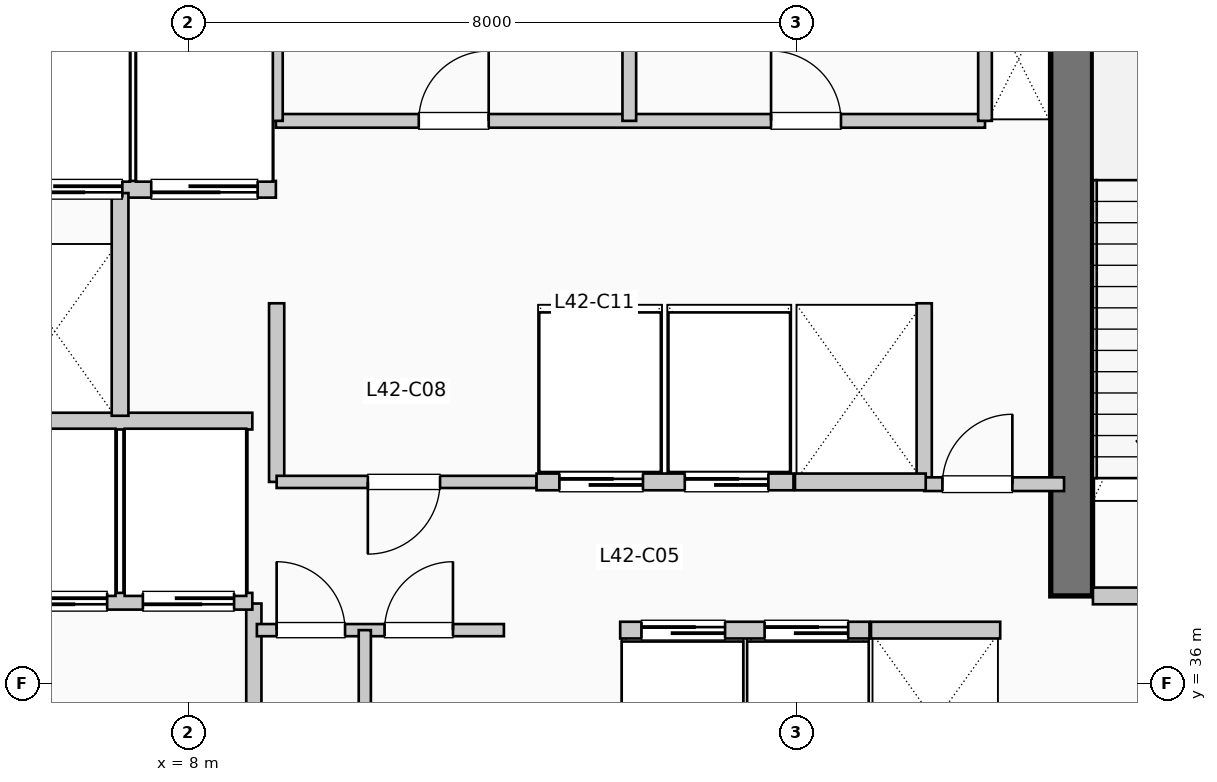
"""IFC4 building model, lengths in metres.
Left out: names, types, materials, properties, quantities, classifications, styles, units other than length and angle.
Written with IfcOpenShell. Run it as: python <this file> out.ifc"""

import sys

from ifc_helpers import new_model, si_unit, direction, frame, frame_2d, origin, place, context, subcontext, project, spatial, rectangle, extrude, element, fill, save


model = new_model("IFC4")
c1 = context("Model", 3, precision=1e-05, world=origin(), true_north=direction((0.0, 1.0)))
c2 = subcontext(c1, "Body", "Model", "MODEL_VIEW")
j1 = project(units=[si_unit("LENGTHUNIT", "METRE"), si_unit("PLANEANGLEUNIT", "RADIAN")], contexts=[c1])
p1 = place(None, origin())
s1 = spatial("IfcSite", under=j1, at=p1, CompositionType="ELEMENT")
p2 = place(p1, origin())
s2 = spatial("IfcBuilding", under=s1, at=p2, CompositionType="ELEMENT")
p3 = place(p2, frame((0.0, 0.0, 174.57)))
s3 = spatial("IfcBuildingStorey", under=s2, at=p3, CompositionType="ELEMENT", Elevation=174.57)
p4 = place(p3, frame((19.62, 37.15, 0.0), z_axis=(0.0, 0.0, 1.0), x_axis=(0.0, 1.0, 0.0)))
e1 = element("IfcWall", 1, at=p4, inside=s3, PredefinedType="SHEAR", context=c2, shape_type="SweptSolid", body=[
    extrude(rectangle(XDim=7.89, YDim=0.55, at=frame_2d((3.945, 0.0))), origin(), (0.0, 0.0, 1.0), 4.95),
])
p5 = place(p3, frame((8.86, 34.55, 0.0), z_axis=(0.0, 0.0, 1.0), x_axis=(0.0, 1.0, 0.0)))
e2 = element("IfcWall", 2, at=p5, inside=s3, PredefinedType="PARTITIONING", context=c2, shape_type="SweptSolid", body=[
    extrude(rectangle(XDim=2.5, YDim=0.2, at=frame_2d((1.25, 0.0))), origin(), (0.0, 0.0, 1.0), 4.7),
])
p6 = place(p3, frame((19.9, 37.15, 0.0), z_axis=(0.0, 0.0, 1.0), x_axis=(1.0, 0.0, 0.0)))
e3 = element("IfcWall", 3, at=p6, inside=s3, PredefinedType="PARTITIONING", context=c2, shape_type="SweptSolid", body=[
    extrude(rectangle(XDim=3.15, YDim=0.22, at=frame_2d((1.575, 0.0))), origin(), (0.0, 0.0, 1.0), 4.7),
])
p7 = place(p6, frame((2.05, 0.0, 0.0), z_axis=(0.0, 0.0, 1.0), x_axis=(-1.0, 0.0, 0.0)))
e4 = element("IfcOpeningElement", 4, at=p7, cuts=e3, PredefinedType="OPENING", context=c2, shape_type="SweptSolid", body=[
    extrude(rectangle(XDim=1.05, YDim=2.15, at=frame_2d((0.525, 1.075))), frame((0.0, 0.12, 0.0), z_axis=(0.0, -1.0, 0.0), x_axis=(1.0, 0.0, 0.0)), (0.0, 0.0, 1.0), 0.24),
])
p8 = place(p3, frame((5.38, 37.08, 0.0), z_axis=(0.0, 0.0, 1.0), x_axis=(1.0, 0.0, 0.0)))
e5 = element("IfcWall", 5, at=p8, inside=s3, PredefinedType="PARTITIONING", context=c2, shape_type="SweptSolid", body=[
    extrude(rectangle(XDim=3.46, YDim=0.22, at=frame_2d((1.73, 0.0))), origin(), (0.0, 0.0, 1.0), 4.7),
])
p9 = place(p8, frame((1.55, 0.0, 0.0), z_axis=(0.0, 0.0, 1.0), x_axis=(-1.0, 0.0, 0.0)))
e6 = element("IfcOpeningElement", 6, at=p9, cuts=e5, PredefinedType="OPENING", context=c2, shape_type="SweptSolid", body=[
    extrude(rectangle(XDim=1.2, YDim=2.2, at=frame_2d((0.6, 1.1))), frame((0.0, 0.12, 0.0), z_axis=(0.0, -1.0, 0.0), x_axis=(1.0, 0.0, 0.0)), (0.0, 0.0, 1.0), 0.24),
])
p10 = place(p8, frame((3.22, 0.0, 0.0), z_axis=(0.0, 0.0, 1.0), x_axis=(-1.0, 0.0, 0.0)))
e7 = element("IfcOpeningElement", 7, at=p10, cuts=e5, PredefinedType="OPENING", context=c2, shape_type="SweptSolid", body=[
    extrude(rectangle(XDim=1.2, YDim=2.2, at=frame_2d((0.6, 1.1))), frame((0.0, 0.12, 0.0), z_axis=(0.0, -1.0, 0.0), x_axis=(1.0, 0.0, 0.0)), (0.0, 0.0, 1.0), 0.24),
])
p11 = place(p3, frame((5.38, 39.45, 0.0), z_axis=(0.0, 0.0, 1.0), x_axis=(1.0, 0.0, 0.0)))
e8 = element("IfcWall", 8, at=p11, inside=s3, PredefinedType="PARTITIONING", context=c2, shape_type="SweptSolid", body=[
    extrude(rectangle(XDim=3.46, YDim=0.22, at=frame_2d((1.73, 0.0))), origin(), (0.0, 0.0, 1.0), 4.7),
])
p12 = place(p3, frame((5.38, 42.5, 0.0), z_axis=(0.0, 0.0, 1.0), x_axis=(1.0, 0.0, 0.0)))
e9 = element("IfcWall", 9, at=p12, inside=s3, PredefinedType="PARTITIONING", context=c2, shape_type="SweptSolid", body=[
    extrude(rectangle(XDim=3.77, YDim=0.22, at=frame_2d((1.885, 0.0))), origin(), (0.0, 0.0, 1.0), 4.7),
])
p13 = place(p12, frame((1.75, 0.0, 0.0), z_axis=(0.0, 0.0, 1.0), x_axis=(-1.0, 0.0, 0.0)))
e10 = element("IfcOpeningElement", 10, at=p13, cuts=e9, PredefinedType="OPENING", context=c2, shape_type="SweptSolid", body=[
    extrude(rectangle(XDim=1.4, YDim=2.2, at=frame_2d((0.7, 1.1))), frame((0.0, 0.12, 0.0), z_axis=(0.0, -1.0, 0.0), x_axis=(1.0, 0.0, 0.0)), (0.0, 0.0, 1.0), 0.24),
])
p14 = place(p12, frame((3.53, 0.0, 0.0), z_axis=(0.0, 0.0, 1.0), x_axis=(-1.0, 0.0, 0.0)))
e11 = element("IfcOpeningElement", 11, at=p14, cuts=e9, PredefinedType="OPENING", context=c2, shape_type="SweptSolid", body=[
    extrude(rectangle(XDim=1.4, YDim=2.2, at=frame_2d((0.7, 1.1))), frame((0.0, 0.12, 0.0), z_axis=(0.0, -1.0, 0.0), x_axis=(1.0, 0.0, 0.0)), (0.0, 0.0, 1.0), 0.24),
])
p15 = place(p3, frame((7.1, 39.52, 0.0), z_axis=(0.0, 0.0, 1.0), x_axis=(0.0, 1.0, 0.0)))
e12 = element("IfcWall", 12, at=p15, inside=s3, PredefinedType="PARTITIONING", context=c2, shape_type="SweptSolid", body=[
    extrude(rectangle(XDim=2.93, YDim=0.22, at=frame_2d((1.465, 0.0))), origin(), (0.0, 0.0, 1.0), 4.7),
])
for number, where, z_axis, x_axis in (
    (13, (9.16, 38.65, 0.0), (0.0, 0.0, 1.0), (0.0, 1.0, 0.0)),
    (14, (17.68, 38.65, 0.0), (0.0, 0.0, 1.0), (0.0, 1.0, 0.0)),
):
    element("IfcWall", number, at=place(p3, frame(where, z_axis=z_axis, x_axis=x_axis)), inside=s3, PredefinedType="PARTITIONING", context=c2, shape_type="SweptSolid", body=[
        extrude(rectangle(XDim=2.35, YDim=0.2, at=frame_2d((1.175, 0.0))), origin(), (0.0, 0.0, 1.0), 4.7),
    ])
p16 = place(p3, frame((17.68, 38.62, 0.0), z_axis=(0.0, 0.0, 1.0), x_axis=(1.0, 0.0, 0.0)))
e15 = element("IfcWall", 15, at=p16, inside=s3, PredefinedType="PARTITIONING", context=c2, shape_type="SweptSolid", body=[
    extrude(rectangle(XDim=1.84, YDim=0.18, at=frame_2d((0.92, 0.0))), origin(), (0.0, 0.0, 1.0), 4.7),
])
p17 = place(p16, frame((0.24, 0.0, 0.0)))
e16 = element("IfcOpeningElement", 16, at=p17, cuts=e15, PredefinedType="OPENING", context=c2, shape_type="SweptSolid", body=[
    extrude(rectangle(XDim=0.92, YDim=2.1, at=frame_2d((0.46, 1.05))), frame((0.0, 0.1, 0.0), z_axis=(0.0, -1.0, 0.0), x_axis=(1.0, 0.0, 0.0)), (0.0, 0.0, 1.0), 0.2),
])
p18 = place(p3, frame((8.9, 36.7, 0.0), z_axis=(0.0, 0.0, 1.0), x_axis=(1.0, 0.0, 0.0)))
e17 = element("IfcWall", 17, at=p18, inside=s3, PredefinedType="PARTITIONING", context=c2, shape_type="SweptSolid", body=[
    extrude(rectangle(XDim=3.25, YDim=0.16, at=frame_2d((1.625, 0.0))), origin(), (0.0, 0.0, 1.0), 4.7),
])
p19 = place(p18, frame((0.26, 0.0, 0.0)))
e18 = element("IfcOpeningElement", 18, at=p19, cuts=e17, PredefinedType="OPENING", context=c2, shape_type="SweptSolid", body=[
    extrude(rectangle(XDim=0.9, YDim=2.15, at=frame_2d((0.45, 1.075))), frame((0.0, 0.09, 0.0), z_axis=(0.0, -1.0, 0.0), x_axis=(1.0, 0.0, 0.0)), (0.0, 0.0, 1.0), 0.18),
])
p20 = place(p18, frame((1.68, 0.0, 0.0)))
e19 = element("IfcOpeningElement", 19, at=p20, cuts=e17, PredefinedType="OPENING", context=c2, shape_type="SweptSolid", body=[
    extrude(rectangle(XDim=0.9, YDim=2.15, at=frame_2d((0.45, 1.075))), frame((0.0, 0.09, 0.0), z_axis=(0.0, -1.0, 0.0), x_axis=(1.0, 0.0, 0.0)), (0.0, 0.0, 1.0), 0.18),
])
p21 = place(p3, frame((10.32, 34.55, 0.0), z_axis=(0.0, 0.0, 1.0), x_axis=(0.0, 1.0, 0.0)))
e20 = element("IfcWall", 20, at=p21, inside=s3, PredefinedType="PARTITIONING", context=c2, shape_type="SweptSolid", body=[
    extrude(rectangle(XDim=2.15, YDim=0.16, at=frame_2d((1.075, 0.0))), origin(), (0.0, 0.0, 1.0), 4.7),
])
p22 = place(p3, frame((9.16, 38.65, 0.0), z_axis=(0.0, 0.0, 1.0), x_axis=(1.0, 0.0, 0.0)))
e21 = element("IfcWall", 21, at=p22, inside=s3, PredefinedType="PARTITIONING", context=c2, shape_type="SweptSolid", body=[
    extrude(rectangle(XDim=3.42, YDim=0.16, at=frame_2d((1.71, 0.0))), origin(), (0.0, 0.0, 1.0), 4.7),
])
p23 = place(p22, frame((2.15, 0.0, 0.0), z_axis=(0.0, 0.0, 1.0), x_axis=(-1.0, 0.0, 0.0)))
e22 = element("IfcOpeningElement", 22, at=p23, cuts=e21, PredefinedType="OPENING", context=c2, shape_type="SweptSolid", body=[
    extrude(rectangle(XDim=0.95, YDim=2.15, at=frame_2d((0.475, 1.075))), frame((0.0, 0.09, 0.0), z_axis=(0.0, -1.0, 0.0), x_axis=(1.0, 0.0, 0.0)), (0.0, 0.0, 1.0), 0.18),
])
p24 = place(p3, frame((13.68, 36.7, 0.0), z_axis=(0.0, 0.0, 1.0), x_axis=(1.0, 0.0, 0.0)))
e23 = element("IfcWall", 23, at=p24, inside=s3, PredefinedType="PARTITIONING", context=c2, shape_type="SweptSolid", body=[
    extrude(rectangle(XDim=3.28, YDim=0.22, at=frame_2d((1.64, 0.0))), origin(), (0.0, 0.0, 1.0), 4.7),
])
p25 = place(p24, frame((0.28, 0.0, 0.0)))
e24 = element("IfcOpeningElement", 24, at=p25, cuts=e23, PredefinedType="OPENING", context=c2, shape_type="SweptSolid", body=[
    extrude(rectangle(XDim=1.1, YDim=2.2, at=frame_2d((0.55, 1.1))), frame((0.0, 0.12, 0.0), z_axis=(0.0, -1.0, 0.0), x_axis=(1.0, 0.0, 0.0)), (0.0, 0.0, 1.0), 0.24),
])
p26 = place(p24, frame((1.9, 0.0, 0.0)))
e25 = element("IfcOpeningElement", 25, at=p26, cuts=e23, PredefinedType="OPENING", context=c2, shape_type="SweptSolid", body=[
    extrude(rectangle(XDim=1.1, YDim=2.2, at=frame_2d((0.55, 1.1))), frame((0.0, 0.12, 0.0), z_axis=(0.0, -1.0, 0.0), x_axis=(1.0, 0.0, 0.0)), (0.0, 0.0, 1.0), 0.24),
])
p27 = place(p3, frame((12.58, 38.65, 0.0), z_axis=(0.0, 0.0, 1.0), x_axis=(1.0, 0.0, 0.0)))
e26 = element("IfcWall", 26, at=p27, inside=s3, PredefinedType="PARTITIONING", context=c2, shape_type="SweptSolid", body=[
    extrude(rectangle(XDim=3.38, YDim=0.22, at=frame_2d((1.69, 0.0))), origin(), (0.0, 0.0, 1.0), 4.7),
])
p28 = place(p27, frame((0.3, 0.0, 0.0)))
e27 = element("IfcOpeningElement", 27, at=p28, cuts=e26, PredefinedType="OPENING", context=c2, shape_type="SweptSolid", body=[
    extrude(rectangle(XDim=1.1, YDim=2.2, at=frame_2d((0.55, 1.1))), frame((0.0, 0.12, 0.0), z_axis=(0.0, -1.0, 0.0), x_axis=(1.0, 0.0, 0.0)), (0.0, 0.0, 1.0), 0.24),
])
p29 = place(p27, frame((1.95, 0.0, 0.0)))
e28 = element("IfcOpeningElement", 28, at=p29, cuts=e26, PredefinedType="OPENING", context=c2, shape_type="SweptSolid", body=[
    extrude(rectangle(XDim=1.1, YDim=2.2, at=frame_2d((0.55, 1.1))), frame((0.0, 0.12, 0.0), z_axis=(0.0, -1.0, 0.0), x_axis=(1.0, 0.0, 0.0)), (0.0, 0.0, 1.0), 0.24),
])
p30 = place(p3, frame((16.98, 36.7, 0.0), z_axis=(0.0, 0.0, 1.0), x_axis=(1.0, 0.0, 0.0)))
e29 = element("IfcWall", 29, at=p30, inside=s3, PredefinedType="PARTITIONING", context=c2, shape_type="SweptSolid", body=[
    extrude(rectangle(XDim=1.7, YDim=0.22, at=frame_2d((0.85, 0.0))), origin(), (0.0, 0.0, 1.0), 4.7),
])
p31 = place(p3, frame((15.98, 38.65, 0.0), z_axis=(0.0, 0.0, 1.0), x_axis=(1.0, 0.0, 0.0)))
e30 = element("IfcWall", 30, at=p31, inside=s3, PredefinedType="PARTITIONING", context=c2, shape_type="SweptSolid", body=[
    extrude(rectangle(XDim=1.72, YDim=0.22, at=frame_2d((0.86, 0.0))), origin(), (0.0, 0.0, 1.0), 4.7),
])
p32 = place(p3, frame((9.15, 43.4, 0.0), z_axis=(0.0, 0.0, 1.0), x_axis=(1.0, 0.0, 0.0)))
e31 = element("IfcWall", 31, at=p32, inside=s3, PredefinedType="PLUMBINGWALL", context=c2, shape_type="SweptSolid", body=[
    extrude(rectangle(XDim=9.33, YDim=0.18, at=frame_2d((4.665, 0.0))), origin(), (0.0, 0.0, 1.0), 4.7),
])
p33 = place(p32, frame((1.88, 0.0, 0.0)))
e32 = element("IfcOpeningElement", 32, at=p33, cuts=e31, PredefinedType="OPENING", context=c2, shape_type="SweptSolid", body=[
    extrude(rectangle(XDim=0.92, YDim=2.1, at=frame_2d((0.46, 1.05))), frame((0.0, 0.1, 0.0), z_axis=(0.0, -1.0, 0.0), x_axis=(1.0, 0.0, 0.0)), (0.0, 0.0, 1.0), 0.2),
])
p34 = place(p32, frame((6.515, 0.0, 0.0)))
e33 = element("IfcOpeningElement", 33, at=p34, cuts=e31, PredefinedType="OPENING", context=c2, shape_type="SweptSolid", body=[
    extrude(rectangle(XDim=0.92, YDim=2.1, at=frame_2d((0.46, 1.05))), frame((0.0, 0.1, 0.0), z_axis=(0.0, -1.0, 0.0), x_axis=(1.0, 0.0, 0.0)), (0.0, 0.0, 1.0), 0.2),
])
for number, where, z_axis, x_axis in (
    (34, (9.15, 43.4, 0.0), (0.0, 0.0, 1.0), (0.0, 1.0, 0.0)),
    (35, (18.48, 43.4, 0.0), (0.0, 0.0, 1.0), (0.0, 1.0, 0.0)),
    (36, (13.8, 43.4, 0.0), (0.0, 0.0, 1.0), (0.0, 1.0, 0.0)),
):
    element("IfcWall", number, at=place(p3, frame(where, z_axis=z_axis, x_axis=x_axis)), inside=s3, PredefinedType="PLUMBINGWALL", context=c2, shape_type="SweptSolid", body=[
        extrude(rectangle(XDim=1.88, YDim=0.18, at=frame_2d((0.94, 0.0))), origin(), (0.0, 0.0, 1.0), 4.7),
    ])
p35 = place(p9, origin())
e37 = element("IfcDoor", 37, at=p35, inside=s3, OperationType="SLIDING_TO_RIGHT", PredefinedType="DOOR", context=c2, shape_type="SweptSolid", body=[
    extrude(rectangle(XDim=1.2, YDim=2.2, at=frame_2d((0.6, 1.1))), frame((0.0, 0.025, 0.0), z_axis=(0.0, -1.0, 0.0), x_axis=(1.0, 0.0, 0.0)), (0.0, 0.0, 1.0), 0.05),
])
fill(e6, e37)
p36 = place(p10, origin())
e38 = element("IfcDoor", 38, at=p36, inside=s3, OperationType="SLIDING_TO_RIGHT", PredefinedType="DOOR", context=c2, shape_type="SweptSolid", body=[
    extrude(rectangle(XDim=1.2, YDim=2.2, at=frame_2d((0.6, 1.1))), frame((0.0, 0.025, 0.0), z_axis=(0.0, -1.0, 0.0), x_axis=(1.0, 0.0, 0.0)), (0.0, 0.0, 1.0), 0.05),
])
fill(e7, e38)
p37 = place(p13, origin())
e39 = element("IfcDoor", 39, at=p37, inside=s3, OperationType="SLIDING_TO_LEFT", PredefinedType="DOOR", context=c2, shape_type="SweptSolid", body=[
    extrude(rectangle(XDim=1.4, YDim=2.2, at=frame_2d((0.7, 1.1))), frame((0.0, 0.025, 0.0), z_axis=(0.0, -1.0, 0.0), x_axis=(1.0, 0.0, 0.0)), (0.0, 0.0, 1.0), 0.05),
])
fill(e10, e39)
p38 = place(p14, origin())
e40 = element("IfcDoor", 40, at=p38, inside=s3, OperationType="SLIDING_TO_LEFT", PredefinedType="DOOR", context=c2, shape_type="SweptSolid", body=[
    extrude(rectangle(XDim=1.4, YDim=2.2, at=frame_2d((0.7, 1.1))), frame((0.0, 0.025, 0.0), z_axis=(0.0, -1.0, 0.0), x_axis=(1.0, 0.0, 0.0)), (0.0, 0.0, 1.0), 0.05),
])
fill(e11, e40)
p39 = place(p17, origin())
e41 = element("IfcDoor", 41, at=p39, inside=s3, OperationType="SINGLE_SWING_RIGHT", PredefinedType="DOOR", context=c2, shape_type="SweptSolid", body=[
    extrude(rectangle(XDim=0.92, YDim=2.1, at=frame_2d((0.46, 1.05))), frame((0.0, 0.025, 0.0), z_axis=(0.0, -1.0, 0.0), x_axis=(1.0, 0.0, 0.0)), (0.0, 0.0, 1.0), 0.05),
])
fill(e16, e41)
p40 = place(p19, origin())
e42 = element("IfcDoor", 42, at=p40, inside=s3, OperationType="SINGLE_SWING_LEFT", PredefinedType="DOOR", context=c2, shape_type="SweptSolid", body=[
    extrude(rectangle(XDim=0.9, YDim=2.15, at=frame_2d((0.45, 1.075))), frame((0.0, 0.025, 0.0), z_axis=(0.0, -1.0, 0.0), x_axis=(1.0, 0.0, 0.0)), (0.0, 0.0, 1.0), 0.05),
])
fill(e18, e42)
p41 = place(p20, origin())
e43 = element("IfcDoor", 43, at=p41, inside=s3, OperationType="SINGLE_SWING_RIGHT", PredefinedType="DOOR", context=c2, shape_type="SweptSolid", body=[
    extrude(rectangle(XDim=0.9, YDim=2.15, at=frame_2d((0.45, 1.075))), frame((0.0, 0.025, 0.0), z_axis=(0.0, -1.0, 0.0), x_axis=(1.0, 0.0, 0.0)), (0.0, 0.0, 1.0), 0.05),
])
fill(e19, e43)
p42 = place(p23, origin())
e44 = element("IfcDoor", 44, at=p42, inside=s3, OperationType="SINGLE_SWING_LEFT", PredefinedType="DOOR", context=c2, shape_type="SweptSolid", body=[
    extrude(rectangle(XDim=0.95, YDim=2.15, at=frame_2d((0.475, 1.075))), frame((0.0, 0.025, 0.0), z_axis=(0.0, -1.0, 0.0), x_axis=(1.0, 0.0, 0.0)), (0.0, 0.0, 1.0), 0.05),
])
fill(e22, e44)
p43 = place(p25, origin())
e45 = element("IfcDoor", 45, at=p43, inside=s3, OperationType="SLIDING_TO_RIGHT", PredefinedType="DOOR", context=c2, shape_type="SweptSolid", body=[
    extrude(rectangle(XDim=1.1, YDim=2.2, at=frame_2d((0.55, 1.1))), frame((0.0, 0.025, 0.0), z_axis=(0.0, -1.0, 0.0), x_axis=(1.0, 0.0, 0.0)), (0.0, 0.0, 1.0), 0.05),
])
fill(e24, e45)
p44 = place(p26, origin())
e46 = element("IfcDoor", 46, at=p44, inside=s3, OperationType="SLIDING_TO_RIGHT", PredefinedType="DOOR", context=c2, shape_type="SweptSolid", body=[
    extrude(rectangle(XDim=1.1, YDim=2.2, at=frame_2d((0.55, 1.1))), frame((0.0, 0.025, 0.0), z_axis=(0.0, -1.0, 0.0), x_axis=(1.0, 0.0, 0.0)), (0.0, 0.0, 1.0), 0.05),
])
fill(e25, e46)
p45 = place(p28, origin())
e47 = element("IfcDoor", 47, at=p45, inside=s3, OperationType="SLIDING_TO_RIGHT", PredefinedType="DOOR", context=c2, shape_type="SweptSolid", body=[
    extrude(rectangle(XDim=1.1, YDim=2.2, at=frame_2d((0.55, 1.1))), frame((0.0, 0.025, 0.0), z_axis=(0.0, -1.0, 0.0), x_axis=(1.0, 0.0, 0.0)), (0.0, 0.0, 1.0), 0.05),
])
fill(e27, e47)
p46 = place(p29, origin())
e48 = element("IfcDoor", 48, at=p46, inside=s3, OperationType="SLIDING_TO_RIGHT", PredefinedType="DOOR", context=c2, shape_type="SweptSolid", body=[
    extrude(rectangle(XDim=1.1, YDim=2.2, at=frame_2d((0.55, 1.1))), frame((0.0, 0.025, 0.0), z_axis=(0.0, -1.0, 0.0), x_axis=(1.0, 0.0, 0.0)), (0.0, 0.0, 1.0), 0.05),
])
fill(e28, e48)
p47 = place(p33, origin())
e49 = element("IfcDoor", 49, at=p47, inside=s3, OperationType="SINGLE_SWING_RIGHT", PredefinedType="DOOR", context=c2, shape_type="SweptSolid", body=[
    extrude(rectangle(XDim=0.92, YDim=2.1, at=frame_2d((0.46, 1.05))), frame((0.0, 0.025, 0.0), z_axis=(0.0, -1.0, 0.0), x_axis=(1.0, 0.0, 0.0)), (0.0, 0.0, 1.0), 0.05),
])
fill(e32, e49)
p48 = place(p34, origin())
e50 = element("IfcDoor", 50, at=p48, inside=s3, OperationType="SINGLE_SWING_LEFT", PredefinedType="DOOR", context=c2, shape_type="SweptSolid", body=[
    extrude(rectangle(XDim=0.92, YDim=2.1, at=frame_2d((0.46, 1.05))), frame((0.0, 0.025, 0.0), z_axis=(0.0, -1.0, 0.0), x_axis=(1.0, 0.0, 0.0)), (0.0, 0.0, 1.0), 0.05),
])
fill(e33, e50)
save(model, sys.argv[1])
